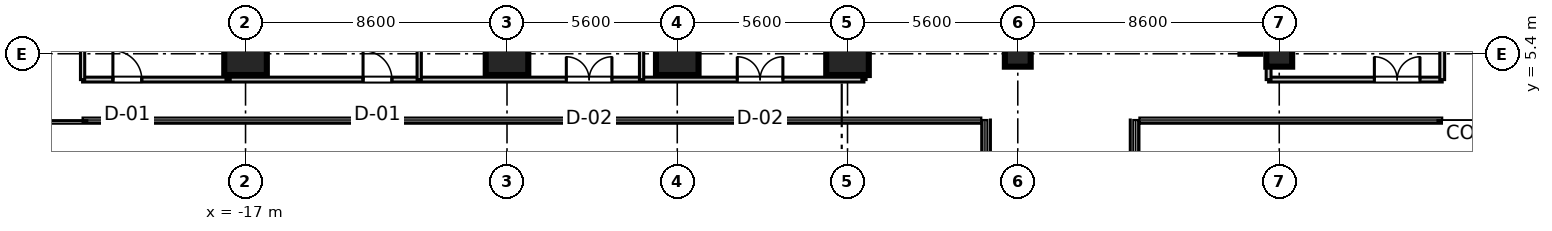
"""IFC4 building model, lengths in metres.
Left out: names, types, materials, properties, quantities, classifications, styles, units other than length and angle.
Written with IfcOpenShell. Run it as: python <this file> out.ifc"""

import sys

from ifc_helpers import new_model, si_unit, direction, frame, frame_2d, origin, origin_2d, place, context, subcontext, project, spatial, rectangle, extrude, source, transform, mapped, element, fill, save


model = new_model("IFC4")
c1 = context("Model", 3, precision=1e-05, world=origin(), true_north=direction((0.0, 1.0)))
c2 = subcontext(c1, "Body", "Model", "MODEL_VIEW")
j1 = project(units=[si_unit("LENGTHUNIT", "METRE"), si_unit("PLANEANGLEUNIT", "RADIAN")], contexts=[c1])
p1 = place(None, origin())
s1 = spatial("IfcSite", under=j1, at=p1, CompositionType="ELEMENT")
p2 = place(p1, origin())
s2 = spatial("IfcBuilding", under=s1, at=p2, CompositionType="ELEMENT")
p3 = place(p2, frame((0.0, 0.0, 54.3)))
s3 = spatial("IfcBuildingStorey", under=s2, at=p3, CompositionType="ELEMENT", Elevation=54.3)
m1 = source(origin(), c2, "Body", "SweptSolid", [
    extrude(rectangle(XDim=1.4, YDim=1.4, at=origin_2d()), origin(), (0.0, 0.0, 1.0), 3.605),
])
for number, where, z_axis, x_axis in (
    (1, (-17.0, 5.4, 0.0), (0.0, 0.0, 1.0), (1.0, 0.0, 0.0)),
    (2, (-8.4, 5.4, 0.0), (0.0, 0.0, 1.0), (1.0, 0.0, 0.0)),
    (3, (-2.8, 5.4, 0.0), (0.0, 0.0, 1.0), (1.0, 0.0, 0.0)),
    (4, (2.8, 5.4, 0.0), (0.0, 0.0, 1.0), (1.0, 0.0, 0.0)),
):
    element("IfcColumn", number, at=place(p3, frame(where, z_axis=z_axis, x_axis=x_axis)), inside=s3, PredefinedType="COLUMN", context=c2, shape_type="MappedRepresentation", body=[
        mapped(m1, transform((0.0, 0.0, 0.0), scale=1.0)),
    ])
m2 = source(origin(), c2, "Body", "SweptSolid", [
    extrude(rectangle(XDim=0.85, YDim=0.85, at=origin_2d()), origin(), (0.0, 0.0, 1.0), 3.605),
])
for number, where, z_axis, x_axis in (
    (5, (8.4, 5.4, 0.0), (0.0, 0.0, 1.0), (1.0, 0.0, 0.0)),
    (6, (17.0, 5.4, 0.0), (0.0, 0.0, 1.0), (1.0, 0.0, 0.0)),
):
    element("IfcColumn", number, at=place(p3, frame(where, z_axis=z_axis, x_axis=x_axis)), inside=s3, PredefinedType="PILASTER", context=c2, shape_type="MappedRepresentation", body=[
        mapped(m2, transform((0.0, 0.0, 0.0), scale=1.0)),
    ])
m3 = source(origin(), c2, "Body", "SweptSolid", [
    extrude(rectangle(XDim=11.6, YDim=0.65, at=frame_2d((5.8, 0.0))), origin(), (0.0, 0.0, 1.0), 3.37),
])
p4 = place(p3, frame((16.05, 5.4, 0.0), z_axis=(0.0, 0.0, 1.0), x_axis=(0.0, 1.0, 0.0)))
e7 = element("IfcWall", 7, at=p4, inside=s3, PredefinedType="SHEAR", context=c2, shape_type="MappedRepresentation", body=[
    mapped(m3, transform((0.0, 0.0, 0.0), scale=1.0)),
])
m4 = source(origin(), c2, "Body", "SweptSolid", [
    extrude(rectangle(XDim=5.71, YDim=0.16, at=frame_2d((2.855, 0.0))), origin(), (0.0, 0.0, 1.0), 2.71),
])
p5 = place(p3, frame((16.65, 4.55, 0.0), z_axis=(0.0, 0.0, 1.0), x_axis=(1.0, 0.0, 0.0)))
e8 = element("IfcWall", 8, at=p5, inside=s3, PredefinedType="PARTITIONING", context=c2, shape_type="MappedRepresentation", body=[
    mapped(m4, transform((0.0, 0.0, 0.0), scale=1.0)),
])
p6 = place(p5, frame((3.479, 0.0, 0.0)))
e9 = element("IfcOpeningElement", 9, at=p6, cuts=e8, PredefinedType="OPENING", context=c2, shape_type="SweptSolid", body=[
    extrude(rectangle(XDim=1.5, YDim=2.15, at=frame_2d((0.75, 1.075))), frame((0.0, 0.09, 0.0), z_axis=(0.0, -1.0, 0.0), x_axis=(1.0, 0.0, 0.0)), (0.0, 0.0, 1.0), 0.18),
])
m5 = source(origin(), c2, "Body", "SweptSolid", [
    extrude(rectangle(XDim=20.55, YDim=0.16, at=frame_2d((10.275, 0.0))), origin(), (0.0, 0.0, 1.0), 2.71),
])
p7 = place(p3, frame((16.65, 4.55, 0.0), z_axis=(0.0, 0.0, 1.0), x_axis=(0.0, 1.0, 0.0)))
e10 = element("IfcWall", 10, at=p7, inside=s3, PredefinedType="PARTITIONING", context=c2, shape_type="MappedRepresentation", body=[
    mapped(m5, transform((0.0, 0.0, 0.0), scale=1.0)),
])
m6 = source(origin(), c2, "Body", "SweptSolid", [
    extrude(rectangle(XDim=19.13, YDim=0.16, at=frame_2d((9.565, 0.0))), origin(), (0.0, 0.0, 1.0), 2.71),
])
p8 = place(p3, frame((22.36, 4.55, 0.0), z_axis=(0.0, 0.0, 1.0), x_axis=(0.0, 1.0, 0.0)))
e11 = element("IfcWall", 11, at=p8, inside=s3, PredefinedType="PARTITIONING", context=c2, shape_type="MappedRepresentation", body=[
    mapped(m6, transform((0.0, 0.0, 0.0), scale=1.0)),
])
m7 = source(origin(), c2, "Body", "SweptSolid", [
    extrude(rectangle(XDim=25.7, YDim=0.16, at=frame_2d((12.85, 0.0))), origin(), (0.0, 0.0, 1.0), 2.71),
])
p9 = place(p3, frame((-22.36, 4.55, 0.0), z_axis=(0.0, 0.0, 1.0), x_axis=(1.0, 0.0, 0.0)))
e12 = element("IfcWall", 12, at=p9, inside=s3, PredefinedType="PARTITIONING", context=c2, shape_type="MappedRepresentation", body=[
    mapped(m7, transform((0.0, 0.0, 0.0), scale=1.0)),
])
p10 = place(p9, frame((0.997, 0.0, 0.0)))
e13 = element("IfcOpeningElement", 13, at=p10, cuts=e12, PredefinedType="OPENING", context=c2, shape_type="SweptSolid", body=[
    extrude(rectangle(XDim=0.95, YDim=2.1, at=frame_2d((0.475, 1.05))), frame((0.0, 0.09, 0.0), z_axis=(0.0, -1.0, 0.0), x_axis=(1.0, 0.0, 0.0)), (0.0, 0.0, 1.0), 0.18),
])
p11 = place(p9, frame((9.225, 0.0, 0.0)))
e14 = element("IfcOpeningElement", 14, at=p11, cuts=e12, PredefinedType="OPENING", context=c2, shape_type="SweptSolid", body=[
    extrude(rectangle(XDim=0.95, YDim=2.1, at=frame_2d((0.475, 1.05))), frame((0.0, 0.09, 0.0), z_axis=(0.0, -1.0, 0.0), x_axis=(1.0, 0.0, 0.0)), (0.0, 0.0, 1.0), 0.18),
])
p12 = place(p9, frame((15.911, 0.0, 0.0)))
e15 = element("IfcOpeningElement", 15, at=p12, cuts=e12, PredefinedType="OPENING", context=c2, shape_type="SweptSolid", body=[
    extrude(rectangle(XDim=1.5, YDim=2.15, at=frame_2d((0.75, 1.075))), frame((0.0, 0.09, 0.0), z_axis=(0.0, -1.0, 0.0), x_axis=(1.0, 0.0, 0.0)), (0.0, 0.0, 1.0), 0.18),
])
p13 = place(p9, frame((21.534, 0.0, 0.0)))
e16 = element("IfcOpeningElement", 16, at=p13, cuts=e12, PredefinedType="OPENING", context=c2, shape_type="SweptSolid", body=[
    extrude(rectangle(XDim=1.5, YDim=2.15, at=frame_2d((0.75, 1.075))), frame((0.0, 0.09, 0.0), z_axis=(0.0, -1.0, 0.0), x_axis=(1.0, 0.0, 0.0)), (0.0, 0.0, 1.0), 0.18),
])
m8 = source(origin(), c2, "Body", "SweptSolid", [
    extrude(rectangle(XDim=19.13, YDim=0.14, at=frame_2d((9.565, 0.0))), origin(), (0.0, 0.0, 1.0), 2.71),
])
p14 = place(p3, frame((-22.36, 4.55, 0.0), z_axis=(0.0, 0.0, 1.0), x_axis=(0.0, 1.0, 0.0)))
e17 = element("IfcWall", 17, at=p14, inside=s3, PredefinedType="PARTITIONING", context=c2, shape_type="MappedRepresentation", body=[
    mapped(m8, transform((0.0, 0.0, 0.0), scale=1.0)),
])
m9 = source(origin(), c2, "Body", "SweptSolid", [
    extrude(rectangle(XDim=20.55, YDim=0.14, at=frame_2d((10.275, 0.0))), origin(), (0.0, 0.0, 1.0), 2.71),
])
for number, where, z_axis, x_axis in (
    (18, (3.34, 4.55, 0.0), (0.0, 0.0, 1.0), (0.0, 1.0, 0.0)),
    (19, (-17.574, 4.55, 0.0), (0.0, 0.0, 1.0), (0.0, 1.0, 0.0)),
    (20, (-11.288, 4.55, 0.0), (0.0, 0.0, 1.0), (0.0, 1.0, 0.0)),
    (21, (-3.974, 4.55, 0.0), (0.0, 0.0, 1.0), (0.0, 1.0, 0.0)),
):
    element("IfcWall", number, at=place(p3, frame(where, z_axis=z_axis, x_axis=x_axis)), inside=s3, PredefinedType="PARTITIONING", context=c2, shape_type="MappedRepresentation", body=[
        mapped(m9, transform((0.0, 0.0, 0.0), scale=1.0)),
    ])
m10 = source(origin(), c2, "Body", "SweptSolid", [
    extrude(rectangle(XDim=1.5, YDim=2.15, at=frame_2d((0.75, 1.075))), frame((0.0, 0.025, 0.0), z_axis=(0.0, -1.0, 0.0), x_axis=(1.0, 0.0, 0.0)), (0.0, 0.0, 1.0), 0.05),
])
p15 = place(p6, origin())
e22 = element("IfcDoor", 22, at=p15, inside=s3, OperationType="DOUBLE_DOOR_SINGLE_SWING", PredefinedType="DOOR", context=c2, shape_type="MappedRepresentation", body=[
    mapped(m10, transform((0.0, 0.0, 0.0), scale=1.0)),
])
fill(e9, e22)
m11 = source(origin(), c2, "Body", "SweptSolid", [
    extrude(rectangle(XDim=0.95, YDim=2.1, at=frame_2d((0.475, 1.05))), frame((0.0, 0.025, 0.0), z_axis=(0.0, -1.0, 0.0), x_axis=(1.0, 0.0, 0.0)), (0.0, 0.0, 1.0), 0.05),
])
p16 = place(p10, origin())
e23 = element("IfcDoor", 23, at=p16, inside=s3, OperationType="SINGLE_SWING_LEFT", PredefinedType="DOOR", context=c2, shape_type="MappedRepresentation", body=[
    mapped(m11, transform((0.0, 0.0, 0.0), scale=1.0)),
])
fill(e13, e23)
p17 = place(p11, origin())
e24 = element("IfcDoor", 24, at=p17, inside=s3, OperationType="SINGLE_SWING_LEFT", PredefinedType="DOOR", context=c2, shape_type="MappedRepresentation", body=[
    mapped(m11, transform((0.0, 0.0, 0.0), scale=1.0)),
])
fill(e14, e24)
p18 = place(p12, origin())
e25 = element("IfcDoor", 25, at=p18, inside=s3, OperationType="DOUBLE_DOOR_SINGLE_SWING", PredefinedType="DOOR", context=c2, shape_type="MappedRepresentation", body=[
    mapped(m10, transform((0.0, 0.0, 0.0), scale=1.0)),
])
fill(e15, e25)
p19 = place(p13, origin())
e26 = element("IfcDoor", 26, at=p19, inside=s3, OperationType="DOUBLE_DOOR_SINGLE_SWING", PredefinedType="DOOR", context=c2, shape_type="MappedRepresentation", body=[
    mapped(m10, transform((0.0, 0.0, 0.0), scale=1.0)),
])
fill(e16, e26)
save(model, sys.argv[1])
